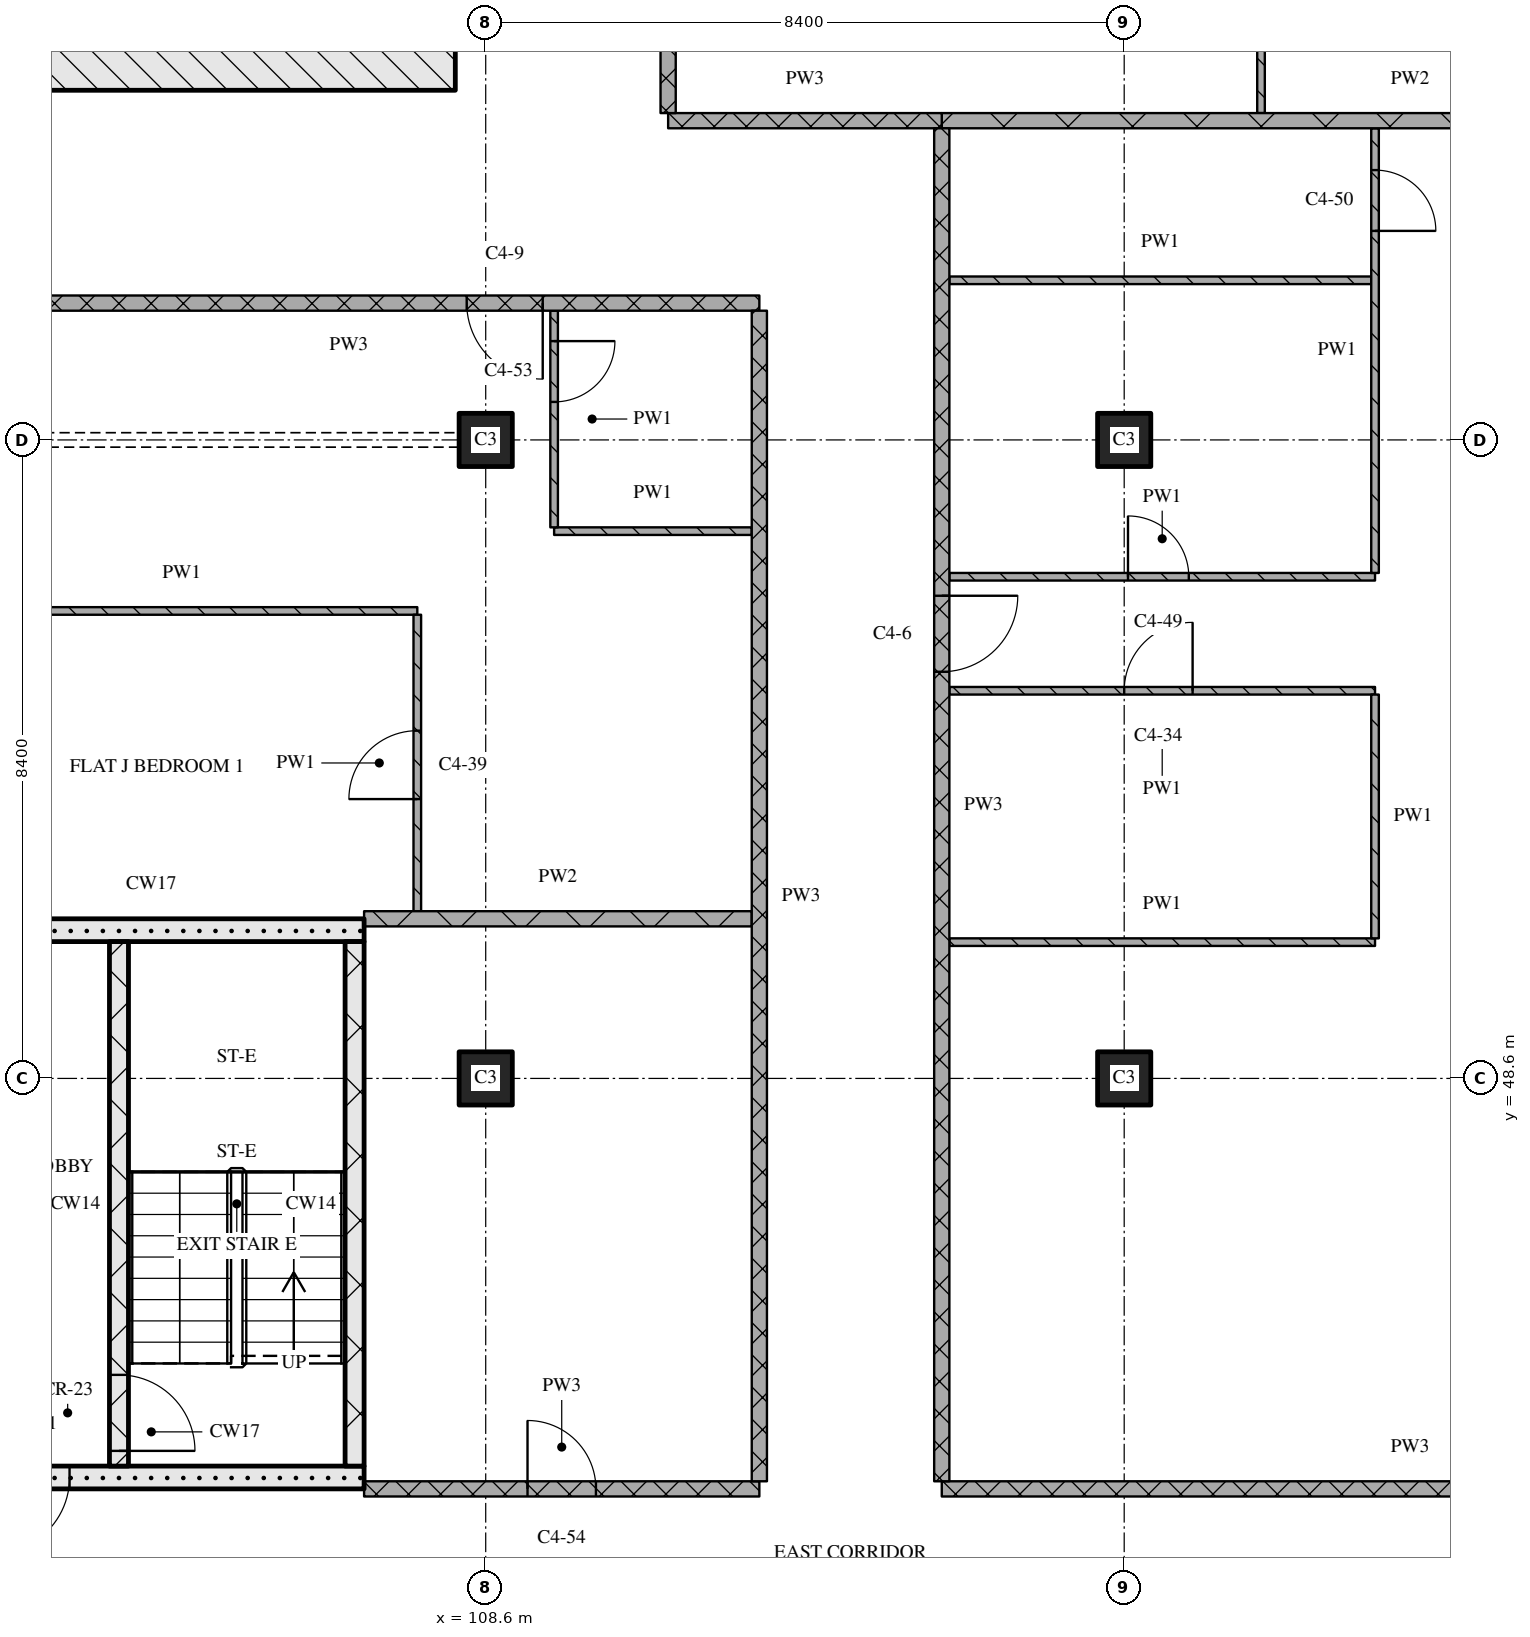
"""IFC4 building model, lengths in metres.
Left out: names, types, materials, properties, quantities, classifications, styles, units other than length and angle.
Written with IfcOpenShell. Run it as: python <this file> out.ifc"""

import sys

from ifc_helpers import new_model, si_unit, direction, frame, frame_2d, origin, origin_2d, place, context, subcontext, project, spatial, rectangle, extrude, element, fill, save


model = new_model("IFC4")
c1 = context("Model", 3, precision=1e-05, world=origin(), true_north=direction((0.0, 1.0)))
c2 = subcontext(c1, "Body", "Model", "MODEL_VIEW")
j1 = project(units=[si_unit("LENGTHUNIT", "METRE"), si_unit("PLANEANGLEUNIT", "RADIAN")], contexts=[c1])
p1 = place(None, origin())
s1 = spatial("IfcSite", under=j1, at=p1, CompositionType="ELEMENT")
p2 = place(p1, origin())
s2 = spatial("IfcBuilding", under=s1, at=p2, CompositionType="ELEMENT")
p3 = place(p2, frame((0.0, 0.0, 183.45)))
s3 = spatial("IfcBuildingStorey", under=s2, at=p3, CompositionType="ELEMENT", Elevation=183.45)
for number, where, z_axis, x_axis in (
    (1, (108.6, 48.6, 0.0), (0.0, 0.0, 1.0), (1.0, 0.0, 0.0)),
    (2, (108.6, 57.0, 0.0), (0.0, 0.0, 1.0), (1.0, 0.0, 0.0)),
    (3, (117.0, 48.6, 0.0), (0.0, 0.0, 1.0), (1.0, 0.0, 0.0)),
    (4, (117.0, 57.0, 0.0), (0.0, 0.0, 1.0), (1.0, 0.0, 0.0)),
):
    element("IfcColumn", number, at=place(p3, frame(where, z_axis=z_axis, x_axis=x_axis)), inside=s3, PredefinedType="COLUMN", context=c2, shape_type="SweptSolid", body=[
        extrude(rectangle(XDim=0.7, YDim=0.7, at=origin_2d()), origin(), (0.0, 0.0, 1.0), 3.6),
    ])
p4 = place(p3, frame((67.0, 62.0, 0.0), z_axis=(0.0, 0.0, 1.0), x_axis=(1.0, 0.0, 0.0)))
e5 = element("IfcWall", 5, at=p4, inside=s3, PredefinedType="SOLIDWALL", context=c2, shape_type="SweptSolid", body=[
    extrude(rectangle(XDim=41.2, YDim=0.8, at=frame_2d((20.6, 0.0))), origin(), (0.0, 0.0, 1.0), 3.32),
])
p5 = place(p4, frame((20.95, 0.0, 0.0)))
e6 = element("IfcOpeningElement", 6, at=p5, cuts=e5, PredefinedType="OPENING", context=c2, shape_type="SweptSolid", body=[
    extrude(rectangle(XDim=1.8, YDim=2.1, at=frame_2d((0.9, 1.05))), frame((0.0, 0.41, 0.0), z_axis=(0.0, -1.0, 0.0), x_axis=(1.0, 0.0, 0.0)), (0.0, 0.0, 1.0), 0.82),
])
p6 = place(p3, frame((101.4, 43.35, 0.0), z_axis=(0.0, 0.0, 1.0), x_axis=(1.0, 0.0, 0.0)))
e7 = element("IfcWall", 7, at=p6, inside=s3, PredefinedType="SOLIDWALL", context=c2, shape_type="SweptSolid", body=[
    extrude(rectangle(XDim=5.6, YDim=0.3, at=frame_2d((2.8, 0.0))), origin(), (0.0, 0.0, 1.0), 3.32),
])
p7 = place(p6, frame((0.725, 0.0, 0.0)))
e8 = element("IfcOpeningElement", 8, at=p7, cuts=e7, PredefinedType="OPENING", context=c2, shape_type="SweptSolid", body=[
    extrude(rectangle(XDim=1.0, YDim=2.1, at=frame_2d((0.5, 1.05))), frame((0.0, 0.16, 0.0), z_axis=(0.0, -1.0, 0.0), x_axis=(1.0, 0.0, 0.0)), (0.0, 0.0, 1.0), 0.32),
])
p8 = place(p3, frame((103.775, 43.5, 0.0), z_axis=(0.0, 0.0, 1.0), x_axis=(0.0, 1.0, 0.0)))
e9 = element("IfcWall", 9, at=p8, inside=s3, PredefinedType="SOLIDWALL", context=c2, shape_type="SweptSolid", body=[
    extrude(rectangle(XDim=6.9, YDim=0.25, at=frame_2d((3.45, 0.0))), origin(), (0.0, 0.0, 1.0), 3.32),
])
p9 = place(p8, frame((0.2, 0.0, 0.0)))
e10 = element("IfcOpeningElement", 10, at=p9, cuts=e9, PredefinedType="OPENING", context=c2, shape_type="SweptSolid", body=[
    extrude(rectangle(XDim=1.0, YDim=2.1, at=frame_2d((0.5, 1.05))), frame((0.0, 0.135, 0.0), z_axis=(0.0, -1.0, 0.0), x_axis=(1.0, 0.0, 0.0)), (0.0, 0.0, 1.0), 0.27),
])
p10 = place(p3, frame((106.875, 43.5, 0.0), z_axis=(0.0, 0.0, 1.0), x_axis=(0.0, 1.0, 0.0)))
e11 = element("IfcWall", 11, at=p10, inside=s3, PredefinedType="SOLIDWALL", context=c2, shape_type="SweptSolid", body=[
    extrude(rectangle(XDim=6.9, YDim=0.25, at=frame_2d((3.45, 0.0))), origin(), (0.0, 0.0, 1.0), 3.32),
])
p11 = place(p3, frame((101.4, 50.55, 0.0), z_axis=(0.0, 0.0, 1.0), x_axis=(1.0, 0.0, 0.0)))
e12 = element("IfcWall", 12, at=p11, inside=s3, PredefinedType="SOLIDWALL", context=c2, shape_type="SweptSolid", body=[
    extrude(rectangle(XDim=5.6, YDim=0.3, at=frame_2d((2.8, 0.0))), origin(), (0.0, 0.0, 1.0), 3.32),
])
p12 = place(p3, frame((107.0, 43.2, 0.0), z_axis=(0.0, 0.0, 1.0), x_axis=(1.0, 0.0, 0.0)))
e13 = element("IfcWall", 13, at=p12, inside=s3, PredefinedType="PARTITIONING", context=c2, shape_type="SweptSolid", body=[
    extrude(rectangle(XDim=5.2, YDim=0.2, at=frame_2d((2.6, 0.0))), origin(), (0.0, 0.0, 1.0), 3.32),
])
p13 = place(p12, frame((2.15, 0.0, 0.0)))
e14 = element("IfcOpeningElement", 14, at=p13, cuts=e13, PredefinedType="OPENING", context=c2, shape_type="SweptSolid", body=[
    extrude(rectangle(XDim=0.9, YDim=2.1, at=frame_2d((0.45, 1.05))), frame((0.0, 0.11, 0.0), z_axis=(0.0, -1.0, 0.0), x_axis=(1.0, 0.0, 0.0)), (0.0, 0.0, 1.0), 0.22),
])
p14 = place(p3, frame((114.6, 43.2, 0.0), z_axis=(0.0, 0.0, 1.0), x_axis=(1.0, 0.0, 0.0)))
e15 = element("IfcWall", 15, at=p14, inside=s3, PredefinedType="PARTITIONING", context=c2, shape_type="SweptSolid", body=[
    extrude(rectangle(XDim=12.32, YDim=0.2, at=frame_2d((6.16, 0.0))), origin(), (0.0, 0.0, 1.0), 3.32),
])
p15 = place(p3, frame((114.7, 50.393, 0.0), z_axis=(0.0, 0.0, 1.0), x_axis=(1.0, 0.0, 0.0)))
e16 = element("IfcWall", 16, at=p15, inside=s3, PredefinedType="PARTITIONING", context=c2, shape_type="SweptSolid", body=[
    extrude(rectangle(XDim=5.6, YDim=0.1, at=frame_2d((2.8, 0.0))), origin(), (0.0, 0.0, 1.0), 3.32),
])
p16 = place(p3, frame((107.0, 50.7, 0.0), z_axis=(0.0, 0.0, 1.0), x_axis=(1.0, 0.0, 0.0)))
e17 = element("IfcWall", 17, at=p16, inside=s3, PredefinedType="PARTITIONING", context=c2, shape_type="SweptSolid", body=[
    extrude(rectangle(XDim=5.1, YDim=0.2, at=frame_2d((2.55, 0.0))), origin(), (0.0, 0.0, 1.0), 3.32),
])
p17 = place(p3, frame((120.3, 53.7, 0.0), z_axis=(0.0, 0.0, 1.0), x_axis=(-1.0, 0.0, 0.0)))
e18 = element("IfcWall", 18, at=p17, inside=s3, PredefinedType="PARTITIONING", context=c2, shape_type="SweptSolid", body=[
    extrude(rectangle(XDim=5.6, YDim=0.1, at=frame_2d((2.8, 0.0))), origin(), (0.0, 0.0, 1.0), 3.32),
])
p18 = place(p17, frame((2.4, 0.0, 0.0)))
e19 = element("IfcOpeningElement", 19, at=p18, cuts=e18, PredefinedType="OPENING", context=c2, shape_type="SweptSolid", body=[
    extrude(rectangle(XDim=0.9, YDim=2.1, at=frame_2d((0.45, 1.05))), frame((0.0, 0.06, 0.0), z_axis=(0.0, -1.0, 0.0), x_axis=(1.0, 0.0, 0.0)), (0.0, 0.0, 1.0), 0.12),
])
p19 = place(p3, frame((101.5, 54.75, 0.0), z_axis=(0.0, 0.0, 1.0), x_axis=(1.0, 0.0, 0.0)))
e20 = element("IfcWall", 20, at=p19, inside=s3, PredefinedType="PARTITIONING", context=c2, shape_type="SweptSolid", body=[
    extrude(rectangle(XDim=6.2, YDim=0.1, at=frame_2d((3.1, 0.0))), origin(), (0.0, 0.0, 1.0), 3.32),
])
p20 = place(p3, frame((114.7, 55.2, 0.0), z_axis=(0.0, 0.0, 1.0), x_axis=(1.0, 0.0, 0.0)))
e21 = element("IfcWall", 21, at=p20, inside=s3, PredefinedType="PARTITIONING", context=c2, shape_type="SweptSolid", body=[
    extrude(rectangle(XDim=5.6, YDim=0.1, at=frame_2d((2.8, 0.0))), origin(), (0.0, 0.0, 1.0), 3.32),
])
p21 = place(p20, frame((2.35, 0.0, 0.0)))
e22 = element("IfcOpeningElement", 22, at=p21, cuts=e21, PredefinedType="OPENING", context=c2, shape_type="SweptSolid", body=[
    extrude(rectangle(XDim=0.8, YDim=2.1, at=frame_2d((0.4, 1.05))), frame((0.0, 0.06, 0.0), z_axis=(0.0, -1.0, 0.0), x_axis=(1.0, 0.0, 0.0)), (0.0, 0.0, 1.0), 0.12),
])
p22 = place(p3, frame((109.5, 55.8, 0.0), z_axis=(0.0, 0.0, 1.0), x_axis=(1.0, 0.0, 0.0)))
e23 = element("IfcWall", 23, at=p22, inside=s3, PredefinedType="PARTITIONING", context=c2, shape_type="SweptSolid", body=[
    extrude(rectangle(XDim=2.6, YDim=0.1, at=frame_2d((1.3, 0.0))), origin(), (0.0, 0.0, 1.0), 3.32),
])
p23 = place(p3, frame((112.2, 58.8, 0.0), z_axis=(0.0, 0.0, 1.0), x_axis=(-1.0, 0.0, 0.0)))
e24 = element("IfcWall", 24, at=p23, inside=s3, PredefinedType="PARTITIONING", context=c2, shape_type="SweptSolid", body=[
    extrude(rectangle(XDim=10.8, YDim=0.2, at=frame_2d((5.4, 0.0))), origin(), (0.0, 0.0, 1.0), 3.32),
])
p24 = place(p23, frame((2.85, 0.0, 0.0)))
e25 = element("IfcOpeningElement", 25, at=p24, cuts=e24, PredefinedType="OPENING", context=c2, shape_type="SweptSolid", body=[
    extrude(rectangle(XDim=1.0, YDim=2.1, at=frame_2d((0.5, 1.05))), frame((0.0, 0.11, 0.0), z_axis=(0.0, -1.0, 0.0), x_axis=(1.0, 0.0, 0.0)), (0.0, 0.0, 1.0), 0.22),
])
p25 = place(p3, frame((114.7, 59.1, 0.0), z_axis=(0.0, 0.0, 1.0), x_axis=(1.0, 0.0, 0.0)))
e26 = element("IfcWall", 26, at=p25, inside=s3, PredefinedType="PARTITIONING", context=c2, shape_type="SweptSolid", body=[
    extrude(rectangle(XDim=5.55, YDim=0.1, at=frame_2d((2.775, 0.0))), origin(), (0.0, 0.0, 1.0), 3.32),
])
p26 = place(p3, frame((111.0, 61.2, 0.0), z_axis=(0.0, 0.0, 1.0), x_axis=(1.0, 0.0, 0.0)))
e27 = element("IfcWall", 27, at=p26, inside=s3, PredefinedType="PARTITIONING", context=c2, shape_type="SweptSolid", body=[
    extrude(rectangle(XDim=3.6, YDim=0.2, at=frame_2d((1.8, 0.0))), origin(), (0.0, 0.0, 1.0), 3.32),
])
p27 = place(p3, frame((114.6, 61.2, 0.0), z_axis=(0.0, 0.0, 1.0), x_axis=(1.0, 0.0, 0.0)))
e28 = element("IfcWall", 28, at=p27, inside=s3, PredefinedType="PARTITIONING", context=c2, shape_type="SweptSolid", body=[
    extrude(rectangle(XDim=12.32, YDim=0.2, at=frame_2d((6.16, 0.0))), origin(), (0.0, 0.0, 1.0), 3.32),
])
p28 = place(p3, frame((107.7, 50.8, 0.0), z_axis=(0.0, 0.0, 1.0), x_axis=(0.0, 1.0, 0.0)))
e29 = element("IfcWall", 29, at=p28, inside=s3, PredefinedType="PARTITIONING", context=c2, shape_type="SweptSolid", body=[
    extrude(rectangle(XDim=3.9, YDim=0.1, at=frame_2d((1.95, 0.0))), origin(), (0.0, 0.0, 1.0), 3.32),
])
p29 = place(p28, frame((1.475, 0.0, 0.0)))
e30 = element("IfcOpeningElement", 30, at=p29, cuts=e29, PredefinedType="OPENING", context=c2, shape_type="SweptSolid", body=[
    extrude(rectangle(XDim=0.9, YDim=2.1, at=frame_2d((0.45, 1.05))), frame((0.0, 0.06, 0.0), z_axis=(0.0, -1.0, 0.0), x_axis=(1.0, 0.0, 0.0)), (0.0, 0.0, 1.0), 0.12),
])
p30 = place(p3, frame((109.5, 58.7, 0.0), z_axis=(0.0, 0.0, 1.0), x_axis=(0.0, -1.0, 0.0)))
e31 = element("IfcWall", 31, at=p30, inside=s3, PredefinedType="PARTITIONING", context=c2, shape_type="SweptSolid", body=[
    extrude(rectangle(XDim=2.85, YDim=0.1, at=frame_2d((1.425, 0.0))), origin(), (0.0, 0.0, 1.0), 3.32),
])
p31 = place(p30, frame((0.4, 0.0, 0.0)))
e32 = element("IfcOpeningElement", 32, at=p31, cuts=e31, PredefinedType="OPENING", context=c2, shape_type="SweptSolid", body=[
    extrude(rectangle(XDim=0.8, YDim=2.1, at=frame_2d((0.4, 1.05))), frame((0.0, 0.06, 0.0), z_axis=(0.0, -1.0, 0.0), x_axis=(1.0, 0.0, 0.0)), (0.0, 0.0, 1.0), 0.12),
])
p32 = place(p3, frame((111.0, 75.32, 0.0), z_axis=(0.0, 0.0, 1.0), x_axis=(0.0, -1.0, 0.0)))
e33 = element("IfcWall", 33, at=p32, inside=s3, PredefinedType="PARTITIONING", context=c2, shape_type="SweptSolid", body=[
    extrude(rectangle(XDim=14.02, YDim=0.2, at=frame_2d((7.01, 0.0))), origin(), (0.0, 0.0, 1.0), 3.32),
])
p33 = place(p32, frame((9.57, 0.0, 0.0)))
e34 = element("IfcOpeningElement", 34, at=p33, cuts=e33, PredefinedType="OPENING", context=c2, shape_type="SweptSolid", body=[
    extrude(rectangle(XDim=1.0, YDim=2.1, at=frame_2d((0.5, 1.05))), frame((0.0, 0.11, 0.0), z_axis=(0.0, -1.0, 0.0), x_axis=(1.0, 0.0, 0.0)), (0.0, 0.0, 1.0), 0.22),
])
p34 = place(p3, frame((112.2, 58.7, 0.0), z_axis=(0.0, 0.0, 1.0), x_axis=(0.0, -1.0, 0.0)))
e35 = element("IfcWall", 35, at=p34, inside=s3, PredefinedType="PARTITIONING", context=c2, shape_type="SweptSolid", body=[
    extrude(rectangle(XDim=15.4, YDim=0.2, at=frame_2d((7.7, 0.0))), origin(), (0.0, 0.0, 1.0), 3.32),
])
p35 = place(p3, frame((114.6, 61.1, 0.0), z_axis=(0.0, 0.0, 1.0), x_axis=(0.0, -1.0, 0.0)))
e36 = element("IfcWall", 36, at=p35, inside=s3, PredefinedType="PARTITIONING", context=c2, shape_type="SweptSolid", body=[
    extrude(rectangle(XDim=17.8, YDim=0.2, at=frame_2d((8.9, 0.0))), origin(), (0.0, 0.0, 1.0), 3.32),
])
p36 = place(p35, frame((6.15, 0.0, 0.0)))
e37 = element("IfcOpeningElement", 37, at=p36, cuts=e36, PredefinedType="OPENING", context=c2, shape_type="SweptSolid", body=[
    extrude(rectangle(XDim=1.0, YDim=2.1, at=frame_2d((0.5, 1.05))), frame((0.0, 0.11, 0.0), z_axis=(0.0, -1.0, 0.0), x_axis=(1.0, 0.0, 0.0)), (0.0, 0.0, 1.0), 0.22),
])
p37 = place(p3, frame((118.8, 61.3, 0.0), z_axis=(0.0, 0.0, 1.0), x_axis=(0.0, 1.0, 0.0)))
e38 = element("IfcWall", 38, at=p37, inside=s3, PredefinedType="PARTITIONING", context=c2, shape_type="SweptSolid", body=[
    extrude(rectangle(XDim=3.15, YDim=0.1, at=frame_2d((1.575, 0.0))), origin(), (0.0, 0.0, 1.0), 3.32),
])
p38 = place(p37, frame((1.15, 0.0, 0.0)))
e39 = element("IfcOpeningElement", 39, at=p38, cuts=e38, PredefinedType="OPENING", context=c2, shape_type="SweptSolid", body=[
    extrude(rectangle(XDim=0.8, YDim=2.1, at=frame_2d((0.4, 1.05))), frame((0.0, 0.06, 0.0), z_axis=(0.0, -1.0, 0.0), x_axis=(1.0, 0.0, 0.0)), (0.0, 0.0, 1.0), 0.12),
])
p39 = place(p3, frame((120.3, 53.65, 0.0), z_axis=(0.0, 0.0, 1.0), x_axis=(0.0, -1.0, 0.0)))
e40 = element("IfcWall", 40, at=p39, inside=s3, PredefinedType="PARTITIONING", context=c2, shape_type="SweptSolid", body=[
    extrude(rectangle(XDim=3.207, YDim=0.1, at=frame_2d((1.604, 0.0))), origin(), (0.0, 0.0, 1.0), 3.32),
])
p40 = place(p3, frame((120.3, 55.25, 0.0), z_axis=(0.0, 0.0, 1.0), x_axis=(0.0, 1.0, 0.0)))
e41 = element("IfcWall", 41, at=p40, inside=s3, PredefinedType="PARTITIONING", context=c2, shape_type="SweptSolid", body=[
    extrude(rectangle(XDim=5.85, YDim=0.1, at=frame_2d((2.925, 0.0))), origin(), (0.0, 0.0, 1.0), 3.32),
])
p41 = place(p40, frame((4.5, 0.0, 0.0)))
e42 = element("IfcOpeningElement", 42, at=p41, cuts=e41, PredefinedType="OPENING", context=c2, shape_type="SweptSolid", body=[
    extrude(rectangle(XDim=0.8, YDim=2.1, at=frame_2d((0.4, 1.05))), frame((0.0, 0.06, 0.0), z_axis=(0.0, -1.0, 0.0), x_axis=(1.0, 0.0, 0.0)), (0.0, 0.0, 1.0), 0.12),
])
p42 = place(p7, origin())
e43 = element("IfcDoor", 43, at=p42, inside=s3, OperationType="SINGLE_SWING_RIGHT", PredefinedType="DOOR", context=c2, shape_type="SweptSolid", body=[
    extrude(rectangle(XDim=1.0, YDim=2.1, at=frame_2d((0.5, 1.05))), frame((0.0, 0.025, 0.0), z_axis=(0.0, -1.0, 0.0), x_axis=(1.0, 0.0, 0.0)), (0.0, 0.0, 1.0), 0.05),
])
fill(e8, e43)
p43 = place(p9, origin())
e44 = element("IfcDoor", 44, at=p43, inside=s3, OperationType="SINGLE_SWING_RIGHT", PredefinedType="DOOR", context=c2, shape_type="SweptSolid", body=[
    extrude(rectangle(XDim=1.0, YDim=2.1, at=frame_2d((0.5, 1.05))), frame((0.0, 0.025, 0.0), z_axis=(0.0, -1.0, 0.0), x_axis=(1.0, 0.0, 0.0)), (0.0, 0.0, 1.0), 0.05),
])
fill(e10, e44)
p44 = place(p13, origin())
e45 = element("IfcDoor", 45, at=p44, inside=s3, OperationType="SINGLE_SWING_LEFT", PredefinedType="DOOR", context=c2, shape_type="SweptSolid", body=[
    extrude(rectangle(XDim=0.9, YDim=2.1, at=frame_2d((0.45, 1.05))), frame((0.0, 0.025, 0.0), z_axis=(0.0, -1.0, 0.0), x_axis=(1.0, 0.0, 0.0)), (0.0, 0.0, 1.0), 0.05),
])
fill(e14, e45)
p45 = place(p18, origin())
e46 = element("IfcDoor", 46, at=p45, inside=s3, OperationType="SINGLE_SWING_RIGHT", PredefinedType="DOOR", context=c2, shape_type="SweptSolid", body=[
    extrude(rectangle(XDim=0.9, YDim=2.1, at=frame_2d((0.45, 1.05))), frame((0.0, 0.025, 0.0), z_axis=(0.0, -1.0, 0.0), x_axis=(1.0, 0.0, 0.0)), (0.0, 0.0, 1.0), 0.05),
])
fill(e19, e46)
p46 = place(p21, origin())
e47 = element("IfcDoor", 47, at=p46, inside=s3, OperationType="SINGLE_SWING_LEFT", PredefinedType="DOOR", context=c2, shape_type="SweptSolid", body=[
    extrude(rectangle(XDim=0.8, YDim=2.1, at=frame_2d((0.4, 1.05))), frame((0.0, 0.025, 0.0), z_axis=(0.0, -1.0, 0.0), x_axis=(1.0, 0.0, 0.0)), (0.0, 0.0, 1.0), 0.05),
])
fill(e22, e47)
p47 = place(p24, origin())
e48 = element("IfcDoor", 48, at=p47, inside=s3, OperationType="SINGLE_SWING_LEFT", PredefinedType="DOOR", context=c2, shape_type="SweptSolid", body=[
    extrude(rectangle(XDim=1.0, YDim=2.1, at=frame_2d((0.5, 1.05))), frame((0.0, 0.025, 0.0), z_axis=(0.0, -1.0, 0.0), x_axis=(1.0, 0.0, 0.0)), (0.0, 0.0, 1.0), 0.05),
])
fill(e25, e48)
p48 = place(p29, origin())
e49 = element("IfcDoor", 49, at=p48, inside=s3, OperationType="SINGLE_SWING_LEFT", PredefinedType="DOOR", context=c2, shape_type="SweptSolid", body=[
    extrude(rectangle(XDim=0.9, YDim=2.1, at=frame_2d((0.45, 1.05))), frame((0.0, 0.025, 0.0), z_axis=(0.0, -1.0, 0.0), x_axis=(1.0, 0.0, 0.0)), (0.0, 0.0, 1.0), 0.05),
])
fill(e30, e49)
p49 = place(p31, origin())
e50 = element("IfcDoor", 50, at=p49, inside=s3, OperationType="SINGLE_SWING_LEFT", PredefinedType="DOOR", context=c2, shape_type="SweptSolid", body=[
    extrude(rectangle(XDim=0.8, YDim=2.1, at=frame_2d((0.4, 1.05))), frame((0.0, 0.025, 0.0), z_axis=(0.0, -1.0, 0.0), x_axis=(1.0, 0.0, 0.0)), (0.0, 0.0, 1.0), 0.05),
])
fill(e32, e50)
p50 = place(p36, origin())
e51 = element("IfcDoor", 51, at=p50, inside=s3, OperationType="SINGLE_SWING_LEFT", PredefinedType="DOOR", context=c2, shape_type="SweptSolid", body=[
    extrude(rectangle(XDim=1.0, YDim=2.1, at=frame_2d((0.5, 1.05))), frame((0.0, 0.025, 0.0), z_axis=(0.0, -1.0, 0.0), x_axis=(1.0, 0.0, 0.0)), (0.0, 0.0, 1.0), 0.05),
])
fill(e37, e51)
p51 = place(p41, origin())
e52 = element("IfcDoor", 52, at=p51, inside=s3, OperationType="SINGLE_SWING_RIGHT", PredefinedType="DOOR", context=c2, shape_type="SweptSolid", body=[
    extrude(rectangle(XDim=0.8, YDim=2.1, at=frame_2d((0.4, 1.05))), frame((0.0, 0.025, 0.0), z_axis=(0.0, -1.0, 0.0), x_axis=(1.0, 0.0, 0.0)), (0.0, 0.0, 1.0), 0.05),
])
fill(e42, e52)
save(model, sys.argv[1])
